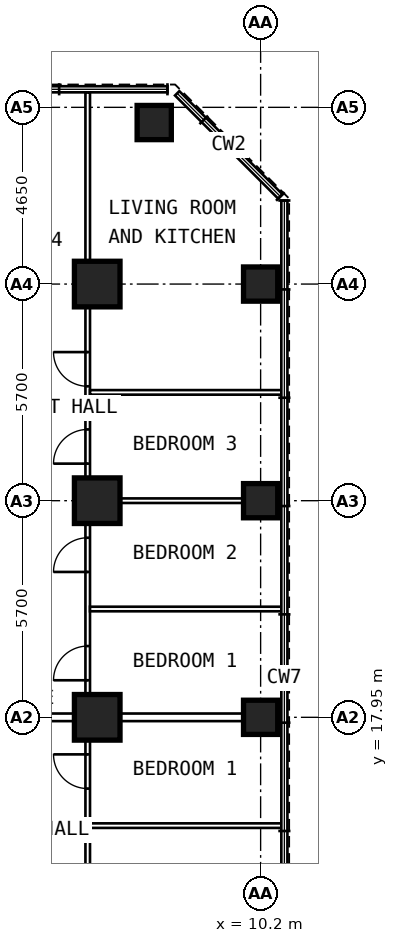
"""IFC4 building model, lengths in metres.
Left out: names, types, materials, properties, quantities, classifications, styles, units other than length and angle.
Written with IfcOpenShell. Run it as: python <this file> out.ifc"""

import sys

from ifc_helpers import new_model, si_unit, direction, frame, frame_2d, origin, origin_2d, place, context, subcontext, project, spatial, rectangle, extrude, element, fill, save


model = new_model("IFC4")
c1 = context("Model", 3, precision=1e-05, world=origin(), true_north=direction((0.0, 1.0)))
c2 = subcontext(c1, "Body", "Model", "MODEL_VIEW")
j1 = project(units=[si_unit("LENGTHUNIT", "METRE"), si_unit("PLANEANGLEUNIT", "RADIAN")], contexts=[c1])
p1 = place(None, origin())
s1 = spatial("IfcSite", under=j1, at=p1, CompositionType="ELEMENT")
p2 = place(p1, origin())
s2 = spatial("IfcBuilding", under=s1, at=p2, CompositionType="ELEMENT")
p3 = place(p2, frame((0.0, 0.0, 75.4)))
s3 = spatial("IfcBuildingStorey", under=s2, at=p3, CompositionType="ELEMENT", Elevation=75.4)
for number, where, z_axis, x_axis in (
    (1, (10.2, 17.95, 0.0), (0.0, 0.0, 1.0), (0.0, 1.0, 0.0)),
    (2, (10.2, 23.65, 0.0), (0.0, 0.0, 1.0), (0.0, 1.0, 0.0)),
    (3, (10.2, 29.35, 0.0), (0.0, 0.0, 1.0), (0.0, 1.0, 0.0)),
    (4, (7.4, 33.6, 0.0), (0.0, 0.0, 1.0), (0.0, 1.0, 0.0)),
):
    element("IfcColumn", number, at=place(p3, frame(where, z_axis=z_axis, x_axis=x_axis)), inside=s3, PredefinedType="COLUMN", context=c2, shape_type="SweptSolid", body=[
        extrude(rectangle(XDim=0.9, YDim=0.9, at=origin_2d()), origin(), (0.0, 0.0, 1.0), 5.4),
    ])
for number, where, z_axis, x_axis in (
    (5, (5.9, 17.95, 0.0), (0.0, 0.0, 1.0), (0.0, 1.0, 0.0)),
    (6, (5.9, 23.65, 0.0), (0.0, 0.0, 1.0), (0.0, 1.0, 0.0)),
    (7, (5.9, 29.35, 0.0), (0.0, 0.0, 1.0), (0.0, 1.0, 0.0)),
):
    element("IfcColumn", number, at=place(p3, frame(where, z_axis=z_axis, x_axis=x_axis)), inside=s3, PredefinedType="COLUMN", context=c2, shape_type="SweptSolid", body=[
        extrude(rectangle(XDim=1.2, YDim=1.2, at=origin_2d()), origin(), (0.0, 0.0, 1.0), 5.4),
    ])
p4 = place(p3, frame((5.65, 9.6, 0.0), z_axis=(0.0, 0.0, 1.0), x_axis=(0.0, 1.0, 0.0)))
e8 = element("IfcWall", 8, at=p4, inside=s3, PredefinedType="PARTITIONING", context=c2, shape_type="SweptSolid", body=[
    extrude(rectangle(XDim=8.1, YDim=0.12, at=frame_2d((4.05, 0.0))), origin(), (0.0, 0.0, 1.0), 5.15),
])
p5 = place(p4, frame((3.4, 0.0, 0.0)))
e9 = element("IfcOpeningElement", 9, at=p5, cuts=e8, PredefinedType="OPENING", context=c2, shape_type="SweptSolid", body=[
    extrude(rectangle(XDim=0.9, YDim=2.1, at=frame_2d((0.45, 1.05))), frame((0.0, 0.072, 0.0), z_axis=(0.0, -1.0, 0.0), x_axis=(1.0, 0.0, 0.0)), (0.0, 0.0, 1.0), 0.144),
])
p6 = place(p4, frame((6.475, 0.0, 0.0)))
e10 = element("IfcOpeningElement", 10, at=p6, cuts=e8, PredefinedType="OPENING", context=c2, shape_type="SweptSolid", body=[
    extrude(rectangle(XDim=0.9, YDim=2.1, at=frame_2d((0.45, 1.05))), frame((0.0, 0.072, 0.0), z_axis=(0.0, -1.0, 0.0), x_axis=(1.0, 0.0, 0.0)), (0.0, 0.0, 1.0), 0.144),
])
p7 = place(p3, frame((5.71, 15.1, 0.0), z_axis=(0.0, 0.0, 1.0), x_axis=(1.0, 0.0, 0.0)))
e11 = element("IfcWall", 11, at=p7, inside=s3, PredefinedType="PARTITIONING", context=c2, shape_type="SweptSolid", body=[
    extrude(rectangle(XDim=5.035, YDim=0.12, at=frame_2d((2.518, 0.0))), origin(), (0.0, 0.0, 1.0), 5.15),
])
p8 = place(p3, frame((5.65, 18.05, 0.0), z_axis=(0.0, 0.0, 1.0), x_axis=(0.0, 1.0, 0.0)))
e12 = element("IfcWall", 12, at=p8, inside=s3, PredefinedType="PARTITIONING", context=c2, shape_type="SweptSolid", body=[
    extrude(rectangle(XDim=16.345, YDim=0.12, at=frame_2d((8.172, 0.0))), origin(), (0.0, 0.0, 1.0), 5.15),
])
p9 = place(p8, frame((0.875, 0.0, 0.0)))
e13 = element("IfcOpeningElement", 13, at=p9, cuts=e12, PredefinedType="OPENING", context=c2, shape_type="SweptSolid", body=[
    extrude(rectangle(XDim=0.9, YDim=2.1, at=frame_2d((0.45, 1.05))), frame((0.0, 0.072, 0.0), z_axis=(0.0, -1.0, 0.0), x_axis=(1.0, 0.0, 0.0)), (0.0, 0.0, 1.0), 0.144),
])
p10 = place(p8, frame((3.725, 0.0, 0.0)))
e14 = element("IfcOpeningElement", 14, at=p10, cuts=e12, PredefinedType="OPENING", context=c2, shape_type="SweptSolid", body=[
    extrude(rectangle(XDim=0.9, YDim=2.1, at=frame_2d((0.45, 1.05))), frame((0.0, 0.072, 0.0), z_axis=(0.0, -1.0, 0.0), x_axis=(1.0, 0.0, 0.0)), (0.0, 0.0, 1.0), 0.144),
])
p11 = place(p8, frame((6.575, 0.0, 0.0)))
e15 = element("IfcOpeningElement", 15, at=p11, cuts=e12, PredefinedType="OPENING", context=c2, shape_type="SweptSolid", body=[
    extrude(rectangle(XDim=0.9, YDim=2.1, at=frame_2d((0.45, 1.05))), frame((0.0, 0.072, 0.0), z_axis=(0.0, -1.0, 0.0), x_axis=(1.0, 0.0, 0.0)), (0.0, 0.0, 1.0), 0.144),
])
p12 = place(p8, frame((8.61, 0.0, 0.0)))
e16 = element("IfcOpeningElement", 16, at=p12, cuts=e12, PredefinedType="OPENING", context=c2, shape_type="SweptSolid", body=[
    extrude(rectangle(XDim=0.9, YDim=2.1, at=frame_2d((0.45, 1.05))), frame((0.0, 0.072, 0.0), z_axis=(0.0, -1.0, 0.0), x_axis=(1.0, 0.0, 0.0)), (0.0, 0.0, 1.0), 0.144),
])
p13 = place(p3, frame((5.71, 20.8, 0.0), z_axis=(0.0, 0.0, 1.0), x_axis=(1.0, 0.0, 0.0)))
e17 = element("IfcWall", 17, at=p13, inside=s3, PredefinedType="PARTITIONING", context=c2, shape_type="SweptSolid", body=[
    extrude(rectangle(XDim=5.035, YDim=0.12, at=frame_2d((2.518, 0.0))), origin(), (0.0, 0.0, 1.0), 5.15),
])
p14 = place(p3, frame((5.71, 23.65, 0.0), z_axis=(0.0, 0.0, 1.0), x_axis=(1.0, 0.0, 0.0)))
e18 = element("IfcWall", 18, at=p14, inside=s3, PredefinedType="PARTITIONING", context=c2, shape_type="SweptSolid", body=[
    extrude(rectangle(XDim=5.035, YDim=0.12, at=frame_2d((2.518, 0.0))), origin(), (0.0, 0.0, 1.0), 4.25),
])
p15 = place(p3, frame((5.71, 26.5, 0.0), z_axis=(0.0, 0.0, 1.0), x_axis=(1.0, 0.0, 0.0)))
e19 = element("IfcWall", 19, at=p15, inside=s3, PredefinedType="PARTITIONING", context=c2, shape_type="SweptSolid", body=[
    extrude(rectangle(XDim=5.035, YDim=0.12, at=frame_2d((2.518, 0.0))), origin(), (0.0, 0.0, 1.0), 5.15),
])
p16 = place(p3, frame((2.1, 17.95, 0.0), z_axis=(0.0, 0.0, 1.0), x_axis=(1.0, 0.0, 0.0)))
e20 = element("IfcWall", 20, at=p16, inside=s3, PredefinedType="PARTITIONING", context=c2, shape_type="SweptSolid", body=[
    extrude(rectangle(XDim=8.645, YDim=0.2, at=frame_2d((4.323, 0.0))), origin(), (0.0, 0.0, 1.0), 4.25),
])
p17 = place(p6, origin())
e21 = element("IfcDoor", 21, at=p17, inside=s3, OperationType="SINGLE_SWING_RIGHT", PredefinedType="DOOR", context=c2, shape_type="SweptSolid", body=[
    extrude(rectangle(XDim=0.9, YDim=2.1, at=frame_2d((0.45, 1.05))), frame((0.0, 0.025, 0.0), z_axis=(0.0, -1.0, 0.0), x_axis=(1.0, 0.0, 0.0)), (0.0, 0.0, 1.0), 0.05),
])
fill(e10, e21)
p18 = place(p9, origin())
e22 = element("IfcDoor", 22, at=p18, inside=s3, OperationType="SINGLE_SWING_LEFT", PredefinedType="DOOR", context=c2, shape_type="SweptSolid", body=[
    extrude(rectangle(XDim=0.9, YDim=2.1, at=frame_2d((0.45, 1.05))), frame((0.0, 0.025, 0.0), z_axis=(0.0, -1.0, 0.0), x_axis=(1.0, 0.0, 0.0)), (0.0, 0.0, 1.0), 0.05),
])
fill(e13, e22)
p19 = place(p10, origin())
e23 = element("IfcDoor", 23, at=p19, inside=s3, OperationType="SINGLE_SWING_LEFT", PredefinedType="DOOR", context=c2, shape_type="SweptSolid", body=[
    extrude(rectangle(XDim=0.9, YDim=2.1, at=frame_2d((0.45, 1.05))), frame((0.0, 0.025, 0.0), z_axis=(0.0, -1.0, 0.0), x_axis=(1.0, 0.0, 0.0)), (0.0, 0.0, 1.0), 0.05),
])
fill(e14, e23)
p20 = place(p11, origin())
e24 = element("IfcDoor", 24, at=p20, inside=s3, OperationType="SINGLE_SWING_LEFT", PredefinedType="DOOR", context=c2, shape_type="SweptSolid", body=[
    extrude(rectangle(XDim=0.9, YDim=2.1, at=frame_2d((0.45, 1.05))), frame((0.0, 0.025, 0.0), z_axis=(0.0, -1.0, 0.0), x_axis=(1.0, 0.0, 0.0)), (0.0, 0.0, 1.0), 0.05),
])
fill(e15, e24)
p21 = place(p12, origin())
e25 = element("IfcDoor", 25, at=p21, inside=s3, OperationType="SINGLE_SWING_RIGHT", PredefinedType="DOOR", context=c2, shape_type="SweptSolid", body=[
    extrude(rectangle(XDim=0.9, YDim=2.1, at=frame_2d((0.45, 1.05))), frame((0.0, 0.025, 0.0), z_axis=(0.0, -1.0, 0.0), x_axis=(1.0, 0.0, 0.0)), (0.0, 0.0, 1.0), 0.05),
])
fill(e16, e25)
save(model, sys.argv[1])
